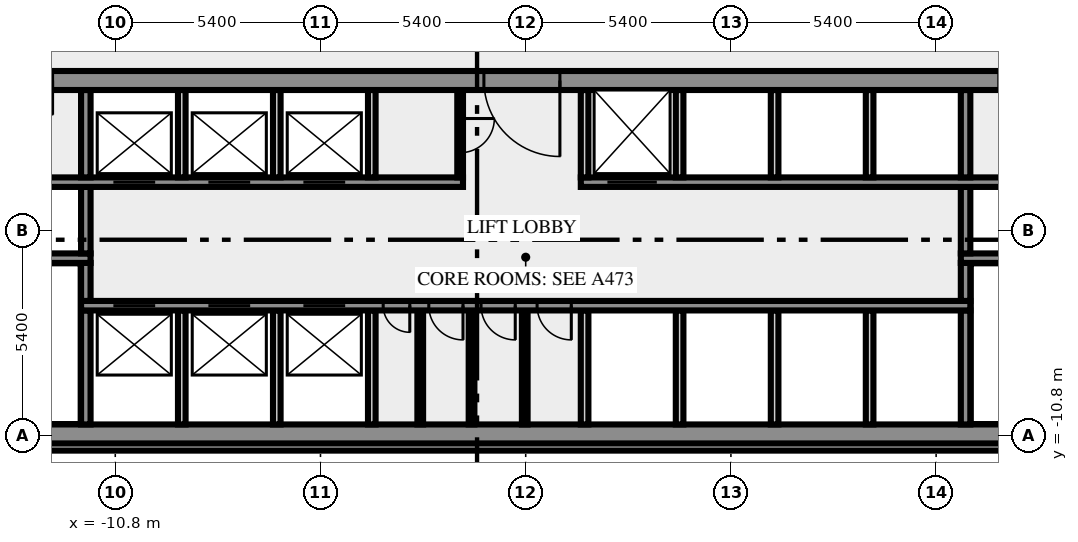
"""IFC4 building model, lengths in metres.
Left out: names, types, materials, properties, quantities, classifications, styles, units other than length and angle.
Written with IfcOpenShell. Run it as: python <this file> out.ifc"""

import sys

from ifc_helpers import new_model, si_unit, direction, frame, frame_2d, origin, place, context, subcontext, project, spatial, rectangle, extrude, element, fill, save


model = new_model("IFC4")
c1 = context("Model", 3, precision=1e-05, world=origin(), true_north=direction((0.0, 1.0)))
c2 = subcontext(c1, "Body", "Model", "MODEL_VIEW")
j1 = project(units=[si_unit("LENGTHUNIT", "METRE"), si_unit("PLANEANGLEUNIT", "RADIAN")], contexts=[c1])
p1 = place(None, origin())
s1 = spatial("IfcSite", under=j1, at=p1, CompositionType="ELEMENT")
p2 = place(p1, origin())
s2 = spatial("IfcBuilding", under=s1, at=p2, CompositionType="ELEMENT")
p3 = place(p2, frame((0.0, 0.0, 121.0)))
s3 = spatial("IfcBuildingStorey", under=s2, at=p3, CompositionType="ELEMENT", Elevation=121.0)
p4 = place(p3, frame((-17.444, -11.088, 0.0), z_axis=(0.0, 0.0, 1.0), x_axis=(1.0, 0.0, 0.0)))
e1 = element("IfcWall", 1, at=p4, inside=s3, PredefinedType="SOLIDWALL", context=c2, shape_type="SweptSolid", body=[
    extrude(rectangle(XDim=34.888, YDim=0.2, at=frame_2d((17.444, 0.0))), origin(), (0.0, 0.0, 1.0), 3.65),
])
p5 = place(p3, frame((-20.0, -10.75, 0.0), z_axis=(0.0, 0.0, 1.0), x_axis=(1.0, 0.0, 0.0)))
e2 = element("IfcWall", 2, at=p5, inside=s3, PredefinedType="SHEAR", context=c2, shape_type="SweptSolid", body=[
    extrude(rectangle(XDim=40.0, YDim=0.5, at=frame_2d((20.0, 0.0))), origin(), (0.0, 0.0, 1.0), 3.65),
])
p6 = place(p5, frame((0.8, 0.0, 1.0)))
e3 = element("IfcOpeningElement", 3, at=p6, cuts=e2, PredefinedType="OPENING", context=c2, shape_type="SweptSolid", body=[
    extrude(rectangle(XDim=1.2, YDim=1.2, at=frame_2d((0.6, 0.6))), frame((0.0, 0.26, 0.0), z_axis=(0.0, -1.0, 0.0), x_axis=(1.0, 0.0, 0.0)), (0.0, 0.0, 1.0), 0.52),
])
p7 = place(p5, frame((38.0, 0.0, 1.0)))
e4 = element("IfcOpeningElement", 4, at=p7, cuts=e2, PredefinedType="OPENING", context=c2, shape_type="SweptSolid", body=[
    extrude(rectangle(XDim=1.2, YDim=1.2, at=frame_2d((0.6, 0.6))), frame((0.0, 0.26, 0.0), z_axis=(0.0, -1.0, 0.0), x_axis=(1.0, 0.0, 0.0)), (0.0, 0.0, 1.0), 0.52),
])
p8 = place(p3, frame((-11.575, -10.5, 0.0), z_axis=(0.0, 0.0, 1.0), x_axis=(0.0, 1.0, 0.0)))
e5 = element("IfcWall", 5, at=p8, inside=s3, PredefinedType="SHEAR", context=c2, shape_type="SweptSolid", body=[
    extrude(rectangle(XDim=3.0, YDim=0.25, at=frame_2d((1.5, 0.0))), origin(), (0.0, 0.0, 1.0), 3.65),
])
for number, where, z_axis, x_axis in (
    (6, (-9.05, -10.5, 0.0), (0.0, 0.0, 1.0), (0.0, 1.0, 0.0)),
    (7, (-6.55, -10.5, 0.0), (0.0, 0.0, 1.0), (0.0, 1.0, 0.0)),
    (8, (-4.05, -10.5, 0.0), (0.0, 0.0, 1.0), (0.0, 1.0, 0.0)),
):
    element("IfcWall", number, at=place(p3, frame(where, z_axis=z_axis, x_axis=x_axis)), inside=s3, PredefinedType="SOLIDWALL", context=c2, shape_type="SweptSolid", body=[
        extrude(rectangle(XDim=3.0, YDim=0.2, at=frame_2d((1.5, 0.0))), origin(), (0.0, 0.0, 1.0), 3.65),
    ])
for number, where, z_axis, x_axis in (
    (9, (-2.775, -10.5, 0.0), (0.0, 0.0, 1.0), (0.0, 1.0, 0.0)),
    (10, (-1.425, -10.5, 0.0), (0.0, 0.0, 1.0), (0.0, 1.0, 0.0)),
    (11, (-0.025, -10.5, 0.0), (0.0, 0.0, 1.0), (0.0, 1.0, 0.0)),
):
    element("IfcWall", number, at=place(p3, frame(where, z_axis=z_axis, x_axis=x_axis)), inside=s3, PredefinedType="PARTITIONING", context=c2, shape_type="SweptSolid", body=[
        extrude(rectangle(XDim=3.0, YDim=0.15, at=frame_2d((1.5, 0.0))), origin(), (0.0, 0.0, 1.0), 3.65),
    ])
for number, where, z_axis, x_axis in (
    (12, (1.55, -10.5, 0.0), (0.0, 0.0, 1.0), (0.0, 1.0, 0.0)),
    (13, (4.05, -10.5, 0.0), (0.0, 0.0, 1.0), (0.0, 1.0, 0.0)),
    (14, (6.55, -10.5, 0.0), (0.0, 0.0, 1.0), (0.0, 1.0, 0.0)),
    (15, (9.05, -10.5, 0.0), (0.0, 0.0, 1.0), (0.0, 1.0, 0.0)),
):
    element("IfcWall", number, at=place(p3, frame(where, z_axis=z_axis, x_axis=x_axis)), inside=s3, PredefinedType="SOLIDWALL", context=c2, shape_type="SweptSolid", body=[
        extrude(rectangle(XDim=3.0, YDim=0.2, at=frame_2d((1.5, 0.0))), origin(), (0.0, 0.0, 1.0), 3.65),
    ])
p9 = place(p3, frame((11.575, -10.5, 0.0), z_axis=(0.0, 0.0, 1.0), x_axis=(0.0, 1.0, 0.0)))
e16 = element("IfcWall", 16, at=p9, inside=s3, PredefinedType="SHEAR", context=c2, shape_type="SweptSolid", body=[
    extrude(rectangle(XDim=3.0, YDim=0.25, at=frame_2d((1.5, 0.0))), origin(), (0.0, 0.0, 1.0), 3.65),
])
p10 = place(p3, frame((11.7, -7.375, 0.0), z_axis=(0.0, 0.0, 1.0), x_axis=(-1.0, 0.0, 0.0)))
e17 = element("IfcWall", 17, at=p10, inside=s3, PredefinedType="SHEAR", context=c2, shape_type="SweptSolid", body=[
    extrude(rectangle(XDim=23.4, YDim=0.25, at=frame_2d((11.7, 0.0))), origin(), (0.0, 0.0, 1.0), 3.65),
])
p11 = place(p10, frame((21.45, 0.0, 0.0)))
e18 = element("IfcOpeningElement", 18, at=p11, cuts=e17, PredefinedType="OPENING", context=c2, shape_type="SweptSolid", body=[
    extrude(rectangle(XDim=1.1, YDim=2.1, at=frame_2d((0.55, 1.05))), frame((0.0, 0.135, 0.0), z_axis=(0.0, -1.0, 0.0), x_axis=(1.0, 0.0, 0.0)), (0.0, 0.0, 1.0), 0.27),
])
p12 = place(p10, frame((18.95, 0.0, 0.0)))
e19 = element("IfcOpeningElement", 19, at=p12, cuts=e17, PredefinedType="OPENING", context=c2, shape_type="SweptSolid", body=[
    extrude(rectangle(XDim=1.1, YDim=2.1, at=frame_2d((0.55, 1.05))), frame((0.0, 0.135, 0.0), z_axis=(0.0, -1.0, 0.0), x_axis=(1.0, 0.0, 0.0)), (0.0, 0.0, 1.0), 0.27),
])
p13 = place(p10, frame((16.45, 0.0, 0.0)))
e20 = element("IfcOpeningElement", 20, at=p13, cuts=e17, PredefinedType="OPENING", context=c2, shape_type="SweptSolid", body=[
    extrude(rectangle(XDim=1.1, YDim=2.1, at=frame_2d((0.55, 1.05))), frame((0.0, 0.135, 0.0), z_axis=(0.0, -1.0, 0.0), x_axis=(1.0, 0.0, 0.0)), (0.0, 0.0, 1.0), 0.27),
])
p14 = place(p10, frame((14.75, 0.0, 0.0)))
e21 = element("IfcOpeningElement", 21, at=p14, cuts=e17, PredefinedType="OPENING", context=c2, shape_type="SweptSolid", body=[
    extrude(rectangle(XDim=0.7, YDim=2.1, at=frame_2d((0.35, 1.05))), frame((0.0, 0.135, 0.0), z_axis=(0.0, -1.0, 0.0), x_axis=(1.0, 0.0, 0.0)), (0.0, 0.0, 1.0), 0.27),
])
p15 = place(p10, frame((13.35, 0.0, 0.0)))
e22 = element("IfcOpeningElement", 22, at=p15, cuts=e17, PredefinedType="OPENING", context=c2, shape_type="SweptSolid", body=[
    extrude(rectangle(XDim=0.9, YDim=2.1, at=frame_2d((0.45, 1.05))), frame((0.0, 0.135, 0.0), z_axis=(0.0, -1.0, 0.0), x_axis=(1.0, 0.0, 0.0)), (0.0, 0.0, 1.0), 0.27),
])
p16 = place(p10, frame((11.975, 0.0, 0.0)))
e23 = element("IfcOpeningElement", 23, at=p16, cuts=e17, PredefinedType="OPENING", context=c2, shape_type="SweptSolid", body=[
    extrude(rectangle(XDim=0.9, YDim=2.1, at=frame_2d((0.45, 1.05))), frame((0.0, 0.135, 0.0), z_axis=(0.0, -1.0, 0.0), x_axis=(1.0, 0.0, 0.0)), (0.0, 0.0, 1.0), 0.27),
])
p17 = place(p10, frame((10.5, 0.0, 0.0)))
e24 = element("IfcOpeningElement", 24, at=p17, cuts=e17, PredefinedType="OPENING", context=c2, shape_type="SweptSolid", body=[
    extrude(rectangle(XDim=0.9, YDim=2.1, at=frame_2d((0.45, 1.05))), frame((0.0, 0.135, 0.0), z_axis=(0.0, -1.0, 0.0), x_axis=(1.0, 0.0, 0.0)), (0.0, 0.0, 1.0), 0.27),
])
for number, where, z_axis, x_axis in (
    (25, (-11.575, -7.25, 0.0), (0.0, 0.0, 1.0), (0.0, 1.0, 0.0)),
    (26, (11.575, -7.25, 0.0), (0.0, 0.0, 1.0), (0.0, 1.0, 0.0)),
):
    element("IfcWall", number, at=place(p3, frame(where, z_axis=z_axis, x_axis=x_axis)), inside=s3, PredefinedType="SHEAR", context=c2, shape_type="SweptSolid", body=[
        extrude(rectangle(XDim=1.0, YDim=0.25, at=frame_2d((0.5, 0.0))), origin(), (0.0, 0.0, 1.0), 3.65),
    ])
p18 = place(p3, frame((-11.45, -6.125, 0.0), z_axis=(0.0, 0.0, 1.0), x_axis=(-1.0, 0.0, 0.0)))
e27 = element("IfcWall", 27, at=p18, inside=s3, PredefinedType="SHEAR", context=c2, shape_type="SweptSolid", body=[
    extrude(rectangle(XDim=8.05, YDim=0.25, at=frame_2d((4.025, 0.0))), origin(), (0.0, 0.0, 1.0), 3.65),
])
p19 = place(p18, frame((6.2, 0.0, 0.0)))
e28 = element("IfcOpeningElement", 28, at=p19, cuts=e27, PredefinedType="OPENING", context=c2, shape_type="SweptSolid", body=[
    extrude(rectangle(XDim=1.8, YDim=2.1, at=frame_2d((0.9, 1.05))), frame((0.0, 0.135, 0.0), z_axis=(0.0, -1.0, 0.0), x_axis=(1.0, 0.0, 0.0)), (0.0, 0.0, 1.0), 0.27),
])
p20 = place(p3, frame((19.5, -6.125, 0.0), z_axis=(0.0, 0.0, 1.0), x_axis=(-1.0, 0.0, 0.0)))
e29 = element("IfcWall", 29, at=p20, inside=s3, PredefinedType="SHEAR", context=c2, shape_type="SweptSolid", body=[
    extrude(rectangle(XDim=8.05, YDim=0.25, at=frame_2d((4.025, 0.0))), origin(), (0.0, 0.0, 1.0), 3.65),
])
p21 = place(p20, frame((0.05, 0.0, 0.0)))
e30 = element("IfcOpeningElement", 30, at=p21, cuts=e29, PredefinedType="OPENING", context=c2, shape_type="SweptSolid", body=[
    extrude(rectangle(XDim=1.8, YDim=2.1, at=frame_2d((0.9, 1.05))), frame((0.0, 0.135, 0.0), z_axis=(0.0, -1.0, 0.0), x_axis=(1.0, 0.0, 0.0)), (0.0, 0.0, 1.0), 0.27),
])
for number, where, z_axis, x_axis in (
    (31, (-11.575, -6.0, 0.0), (0.0, 0.0, 1.0), (0.0, 1.0, 0.0)),
    (32, (11.575, -6.0, 0.0), (0.0, 0.0, 1.0), (0.0, 1.0, 0.0)),
):
    element("IfcWall", number, at=place(p3, frame(where, z_axis=z_axis, x_axis=x_axis)), inside=s3, PredefinedType="SHEAR", context=c2, shape_type="SweptSolid", body=[
        extrude(rectangle(XDim=1.75, YDim=0.25, at=frame_2d((0.875, 0.0))), origin(), (0.0, 0.0, 1.0), 3.65),
    ])
p22 = place(p3, frame((-14.35, -4.125, 0.0), z_axis=(0.0, 0.0, 1.0), x_axis=(1.0, 0.0, 0.0)))
e33 = element("IfcWall", 33, at=p22, inside=s3, PredefinedType="SHEAR", context=c2, shape_type="SweptSolid", body=[
    extrude(rectangle(XDim=12.7, YDim=0.25, at=frame_2d((6.35, 0.0))), origin(), (0.0, 0.0, 1.0), 3.65),
])
p23 = place(p22, frame((3.5, 0.0, 0.0)))
e34 = element("IfcOpeningElement", 34, at=p23, cuts=e33, PredefinedType="OPENING", context=c2, shape_type="SweptSolid", body=[
    extrude(rectangle(XDim=1.1, YDim=2.1, at=frame_2d((0.55, 1.05))), frame((0.0, 0.135, 0.0), z_axis=(0.0, -1.0, 0.0), x_axis=(1.0, 0.0, 0.0)), (0.0, 0.0, 1.0), 0.27),
])
p24 = place(p22, frame((6.0, 0.0, 0.0)))
e35 = element("IfcOpeningElement", 35, at=p24, cuts=e33, PredefinedType="OPENING", context=c2, shape_type="SweptSolid", body=[
    extrude(rectangle(XDim=1.1, YDim=2.1, at=frame_2d((0.55, 1.05))), frame((0.0, 0.135, 0.0), z_axis=(0.0, -1.0, 0.0), x_axis=(1.0, 0.0, 0.0)), (0.0, 0.0, 1.0), 0.27),
])
p25 = place(p22, frame((8.5, 0.0, 0.0)))
e36 = element("IfcOpeningElement", 36, at=p25, cuts=e33, PredefinedType="OPENING", context=c2, shape_type="SweptSolid", body=[
    extrude(rectangle(XDim=1.1, YDim=2.1, at=frame_2d((0.55, 1.05))), frame((0.0, 0.135, 0.0), z_axis=(0.0, -1.0, 0.0), x_axis=(1.0, 0.0, 0.0)), (0.0, 0.0, 1.0), 0.27),
])
p26 = place(p3, frame((1.45, -4.125, 0.0), z_axis=(0.0, 0.0, 1.0), x_axis=(1.0, 0.0, 0.0)))
e37 = element("IfcWall", 37, at=p26, inside=s3, PredefinedType="SHEAR", context=c2, shape_type="SweptSolid", body=[
    extrude(rectangle(XDim=12.9, YDim=0.25, at=frame_2d((6.45, 0.0))), origin(), (0.0, 0.0, 1.0), 3.65),
])
p27 = place(p26, frame((0.7, 0.0, 0.0)))
e38 = element("IfcOpeningElement", 38, at=p27, cuts=e37, PredefinedType="OPENING", context=c2, shape_type="SweptSolid", body=[
    extrude(rectangle(XDim=1.3, YDim=2.1, at=frame_2d((0.65, 1.05))), frame((0.0, 0.135, 0.0), z_axis=(0.0, -1.0, 0.0), x_axis=(1.0, 0.0, 0.0)), (0.0, 0.0, 1.0), 0.27),
])
p28 = place(p3, frame((-11.575, -4.0, 0.0), z_axis=(0.0, 0.0, 1.0), x_axis=(0.0, 1.0, 0.0)))
e39 = element("IfcWall", 39, at=p28, inside=s3, PredefinedType="SHEAR", context=c2, shape_type="SweptSolid", body=[
    extrude(rectangle(XDim=2.3, YDim=0.25, at=frame_2d((1.15, 0.0))), origin(), (0.0, 0.0, 1.0), 3.65),
])
for number, where, z_axis, x_axis in (
    (40, (-9.05, -4.0, 0.0), (0.0, 0.0, 1.0), (0.0, 1.0, 0.0)),
    (41, (-6.55, -4.0, 0.0), (0.0, 0.0, 1.0), (0.0, 1.0, 0.0)),
    (42, (-4.05, -4.0, 0.0), (0.0, 0.0, 1.0), (0.0, 1.0, 0.0)),
):
    element("IfcWall", number, at=place(p3, frame(where, z_axis=z_axis, x_axis=x_axis)), inside=s3, PredefinedType="SOLIDWALL", context=c2, shape_type="SweptSolid", body=[
        extrude(rectangle(XDim=2.3, YDim=0.2, at=frame_2d((1.15, 0.0))), origin(), (0.0, 0.0, 1.0), 3.65),
    ])
p29 = place(p3, frame((-1.725, -1.7, 0.0), z_axis=(0.0, 0.0, 1.0), x_axis=(0.0, -1.0, 0.0)))
e43 = element("IfcWall", 43, at=p29, inside=s3, PredefinedType="PARTITIONING", context=c2, shape_type="SweptSolid", body=[
    extrude(rectangle(XDim=2.3, YDim=0.15, at=frame_2d((1.15, 0.0))), origin(), (0.0, 0.0, 1.0), 3.65),
])
p30 = place(p29, frame((0.75, 0.0, 0.0)))
e44 = element("IfcOpeningElement", 44, at=p30, cuts=e43, PredefinedType="OPENING", context=c2, shape_type="SweptSolid", body=[
    extrude(rectangle(XDim=0.9, YDim=2.1, at=frame_2d((0.45, 1.05))), frame((0.0, 0.085, 0.0), z_axis=(0.0, -1.0, 0.0), x_axis=(1.0, 0.0, 0.0)), (0.0, 0.0, 1.0), 0.17),
])
for number, where, z_axis, x_axis in (
    (45, (1.55, -4.0, 0.0), (0.0, 0.0, 1.0), (0.0, 1.0, 0.0)),
    (46, (4.05, -4.0, 0.0), (0.0, 0.0, 1.0), (0.0, 1.0, 0.0)),
    (47, (6.55, -4.0, 0.0), (0.0, 0.0, 1.0), (0.0, 1.0, 0.0)),
    (48, (9.05, -4.0, 0.0), (0.0, 0.0, 1.0), (0.0, 1.0, 0.0)),
):
    element("IfcWall", number, at=place(p3, frame(where, z_axis=z_axis, x_axis=x_axis)), inside=s3, PredefinedType="SOLIDWALL", context=c2, shape_type="SweptSolid", body=[
        extrude(rectangle(XDim=2.3, YDim=0.2, at=frame_2d((1.15, 0.0))), origin(), (0.0, 0.0, 1.0), 3.65),
    ])
p31 = place(p3, frame((11.575, -4.0, 0.0), z_axis=(0.0, 0.0, 1.0), x_axis=(0.0, 1.0, 0.0)))
e49 = element("IfcWall", 49, at=p31, inside=s3, PredefinedType="SHEAR", context=c2, shape_type="SweptSolid", body=[
    extrude(rectangle(XDim=2.3, YDim=0.25, at=frame_2d((1.15, 0.0))), origin(), (0.0, 0.0, 1.0), 3.65),
])
p32 = place(p3, frame((20.49, -1.45, 0.0), z_axis=(0.0, 0.0, 1.0), x_axis=(-1.0, 0.0, 0.0)))
e50 = element("IfcWall", 50, at=p32, inside=s3, PredefinedType="SHEAR", context=c2, shape_type="SweptSolid", body=[
    extrude(rectangle(XDim=40.98, YDim=0.5, at=frame_2d((20.49, 0.0))), origin(), (0.0, 0.0, 1.0), 3.65),
])
p33 = place(p32, frame((38.14, 0.0, 0.0)))
e51 = element("IfcOpeningElement", 51, at=p33, cuts=e50, PredefinedType="OPENING", context=c2, shape_type="SweptSolid", body=[
    extrude(rectangle(XDim=1.8, YDim=2.1, at=frame_2d((0.9, 1.05))), frame((0.0, 0.26, 0.0), z_axis=(0.0, -1.0, 0.0), x_axis=(1.0, 0.0, 0.0)), (0.0, 0.0, 1.0), 0.52),
])
p34 = place(p32, frame((35.89, 0.0, 0.0)))
e52 = element("IfcOpeningElement", 52, at=p34, cuts=e50, PredefinedType="OPENING", context=c2, shape_type="SweptSolid", body=[
    extrude(rectangle(XDim=0.9, YDim=2.1, at=frame_2d((0.45, 1.05))), frame((0.0, 0.26, 0.0), z_axis=(0.0, -1.0, 0.0), x_axis=(1.0, 0.0, 0.0)), (0.0, 0.0, 1.0), 0.52),
])
p35 = place(p32, frame((32.94, 0.0, 0.0)))
e53 = element("IfcOpeningElement", 53, at=p35, cuts=e50, PredefinedType="OPENING", context=c2, shape_type="SweptSolid", body=[
    extrude(rectangle(XDim=0.9, YDim=2.1, at=frame_2d((0.45, 1.05))), frame((0.0, 0.26, 0.0), z_axis=(0.0, -1.0, 0.0), x_axis=(1.0, 0.0, 0.0)), (0.0, 0.0, 1.0), 0.52),
])
p36 = place(p32, frame((19.59, 0.0, 0.0)))
e54 = element("IfcOpeningElement", 54, at=p36, cuts=e50, PredefinedType="OPENING", context=c2, shape_type="SweptSolid", body=[
    extrude(rectangle(XDim=2.0, YDim=2.1, at=frame_2d((1.0, 1.05))), frame((0.0, 0.26, 0.0), z_axis=(0.0, -1.0, 0.0), x_axis=(1.0, 0.0, 0.0)), (0.0, 0.0, 1.0), 0.52),
])
p37 = place(p32, frame((7.14, 0.0, 0.0)))
e55 = element("IfcOpeningElement", 55, at=p37, cuts=e50, PredefinedType="OPENING", context=c2, shape_type="SweptSolid", body=[
    extrude(rectangle(XDim=0.9, YDim=2.1, at=frame_2d((0.45, 1.05))), frame((0.0, 0.26, 0.0), z_axis=(0.0, -1.0, 0.0), x_axis=(1.0, 0.0, 0.0)), (0.0, 0.0, 1.0), 0.52),
])
p38 = place(p32, frame((5.028, 0.0, 0.0)))
e56 = element("IfcOpeningElement", 56, at=p38, cuts=e50, PredefinedType="OPENING", context=c2, shape_type="SweptSolid", body=[
    extrude(rectangle(XDim=0.8, YDim=2.1, at=frame_2d((0.4, 1.05))), frame((0.0, 0.26, 0.0), z_axis=(0.0, -1.0, 0.0), x_axis=(1.0, 0.0, 0.0)), (0.0, 0.0, 1.0), 0.52),
])
p39 = place(p32, frame((3.452, 0.0, 0.0)))
e57 = element("IfcOpeningElement", 57, at=p39, cuts=e50, PredefinedType="OPENING", context=c2, shape_type="SweptSolid", body=[
    extrude(rectangle(XDim=0.8, YDim=2.1, at=frame_2d((0.4, 1.05))), frame((0.0, 0.26, 0.0), z_axis=(0.0, -1.0, 0.0), x_axis=(1.0, 0.0, 0.0)), (0.0, 0.0, 1.0), 0.52),
])
p40 = place(p32, frame((1.04, 0.0, 0.0)))
e58 = element("IfcOpeningElement", 58, at=p40, cuts=e50, PredefinedType="OPENING", context=c2, shape_type="SweptSolid", body=[
    extrude(rectangle(XDim=1.8, YDim=2.1, at=frame_2d((0.9, 1.05))), frame((0.0, 0.26, 0.0), z_axis=(0.0, -1.0, 0.0), x_axis=(1.0, 0.0, 0.0)), (0.0, 0.0, 1.0), 0.52),
])
p41 = place(p11, origin())
e59 = element("IfcDoor", 59, at=p41, inside=s3, OperationType="DOUBLE_DOOR_SLIDING", PredefinedType="DOOR", context=c2, shape_type="SweptSolid", body=[
    extrude(rectangle(XDim=1.1, YDim=2.1, at=frame_2d((0.55, 1.05))), frame((0.0, 0.025, 0.0), z_axis=(0.0, -1.0, 0.0), x_axis=(1.0, 0.0, 0.0)), (0.0, 0.0, 1.0), 0.05),
])
fill(e18, e59)
p42 = place(p12, origin())
e60 = element("IfcDoor", 60, at=p42, inside=s3, OperationType="DOUBLE_DOOR_SLIDING", PredefinedType="DOOR", context=c2, shape_type="SweptSolid", body=[
    extrude(rectangle(XDim=1.1, YDim=2.1, at=frame_2d((0.55, 1.05))), frame((0.0, 0.025, 0.0), z_axis=(0.0, -1.0, 0.0), x_axis=(1.0, 0.0, 0.0)), (0.0, 0.0, 1.0), 0.05),
])
fill(e19, e60)
p43 = place(p13, origin())
e61 = element("IfcDoor", 61, at=p43, inside=s3, OperationType="DOUBLE_DOOR_SLIDING", PredefinedType="DOOR", context=c2, shape_type="SweptSolid", body=[
    extrude(rectangle(XDim=1.1, YDim=2.1, at=frame_2d((0.55, 1.05))), frame((0.0, 0.025, 0.0), z_axis=(0.0, -1.0, 0.0), x_axis=(1.0, 0.0, 0.0)), (0.0, 0.0, 1.0), 0.05),
])
fill(e20, e61)
p44 = place(p14, origin())
e62 = element("IfcDoor", 62, at=p44, inside=s3, OperationType="SINGLE_SWING_RIGHT", PredefinedType="DOOR", context=c2, shape_type="SweptSolid", body=[
    extrude(rectangle(XDim=0.7, YDim=2.1, at=frame_2d((0.35, 1.05))), frame((0.0, 0.025, 0.0), z_axis=(0.0, -1.0, 0.0), x_axis=(1.0, 0.0, 0.0)), (0.0, 0.0, 1.0), 0.05),
])
fill(e21, e62)
p45 = place(p15, origin())
e63 = element("IfcDoor", 63, at=p45, inside=s3, OperationType="SINGLE_SWING_RIGHT", PredefinedType="DOOR", context=c2, shape_type="SweptSolid", body=[
    extrude(rectangle(XDim=0.9, YDim=2.1, at=frame_2d((0.45, 1.05))), frame((0.0, 0.025, 0.0), z_axis=(0.0, -1.0, 0.0), x_axis=(1.0, 0.0, 0.0)), (0.0, 0.0, 1.0), 0.05),
])
fill(e22, e63)
p46 = place(p16, origin())
e64 = element("IfcDoor", 64, at=p46, inside=s3, OperationType="SINGLE_SWING_RIGHT", PredefinedType="DOOR", context=c2, shape_type="SweptSolid", body=[
    extrude(rectangle(XDim=0.9, YDim=2.1, at=frame_2d((0.45, 1.05))), frame((0.0, 0.025, 0.0), z_axis=(0.0, -1.0, 0.0), x_axis=(1.0, 0.0, 0.0)), (0.0, 0.0, 1.0), 0.05),
])
fill(e23, e64)
p47 = place(p17, origin())
e65 = element("IfcDoor", 65, at=p47, inside=s3, OperationType="SINGLE_SWING_LEFT", PredefinedType="DOOR", context=c2, shape_type="SweptSolid", body=[
    extrude(rectangle(XDim=0.9, YDim=2.1, at=frame_2d((0.45, 1.05))), frame((0.0, 0.025, 0.0), z_axis=(0.0, -1.0, 0.0), x_axis=(1.0, 0.0, 0.0)), (0.0, 0.0, 1.0), 0.05),
])
fill(e24, e65)
p48 = place(p23, origin())
e66 = element("IfcDoor", 66, at=p48, inside=s3, OperationType="DOUBLE_DOOR_SLIDING", PredefinedType="DOOR", context=c2, shape_type="SweptSolid", body=[
    extrude(rectangle(XDim=1.1, YDim=2.1, at=frame_2d((0.55, 1.05))), frame((0.0, 0.025, 0.0), z_axis=(0.0, -1.0, 0.0), x_axis=(1.0, 0.0, 0.0)), (0.0, 0.0, 1.0), 0.05),
])
fill(e34, e66)
p49 = place(p24, origin())
e67 = element("IfcDoor", 67, at=p49, inside=s3, OperationType="DOUBLE_DOOR_SLIDING", PredefinedType="DOOR", context=c2, shape_type="SweptSolid", body=[
    extrude(rectangle(XDim=1.1, YDim=2.1, at=frame_2d((0.55, 1.05))), frame((0.0, 0.025, 0.0), z_axis=(0.0, -1.0, 0.0), x_axis=(1.0, 0.0, 0.0)), (0.0, 0.0, 1.0), 0.05),
])
fill(e35, e67)
p50 = place(p25, origin())
e68 = element("IfcDoor", 68, at=p50, inside=s3, OperationType="DOUBLE_DOOR_SLIDING", PredefinedType="DOOR", context=c2, shape_type="SweptSolid", body=[
    extrude(rectangle(XDim=1.1, YDim=2.1, at=frame_2d((0.55, 1.05))), frame((0.0, 0.025, 0.0), z_axis=(0.0, -1.0, 0.0), x_axis=(1.0, 0.0, 0.0)), (0.0, 0.0, 1.0), 0.05),
])
fill(e36, e68)
p51 = place(p27, origin())
e69 = element("IfcDoor", 69, at=p51, inside=s3, OperationType="DOUBLE_DOOR_SLIDING", PredefinedType="DOOR", context=c2, shape_type="SweptSolid", body=[
    extrude(rectangle(XDim=1.3, YDim=2.1, at=frame_2d((0.65, 1.05))), frame((0.0, 0.025, 0.0), z_axis=(0.0, -1.0, 0.0), x_axis=(1.0, 0.0, 0.0)), (0.0, 0.0, 1.0), 0.05),
])
fill(e38, e69)
p52 = place(p30, origin())
e70 = element("IfcDoor", 70, at=p52, inside=s3, OperationType="SINGLE_SWING_RIGHT", PredefinedType="DOOR", context=c2, shape_type="SweptSolid", body=[
    extrude(rectangle(XDim=0.9, YDim=2.1, at=frame_2d((0.45, 1.05))), frame((0.0, 0.025, 0.0), z_axis=(0.0, -1.0, 0.0), x_axis=(1.0, 0.0, 0.0)), (0.0, 0.0, 1.0), 0.05),
])
fill(e44, e70)
p53 = place(p36, origin())
e71 = element("IfcDoor", 71, at=p53, inside=s3, OperationType="DOUBLE_DOOR_SINGLE_SWING", PredefinedType="DOOR", context=c2, shape_type="SweptSolid", body=[
    extrude(rectangle(XDim=2.0, YDim=2.1, at=frame_2d((1.0, 1.05))), frame((0.0, 0.025, 0.0), z_axis=(0.0, -1.0, 0.0), x_axis=(1.0, 0.0, 0.0)), (0.0, 0.0, 1.0), 0.05),
])
fill(e54, e71)
save(model, sys.argv[1])
